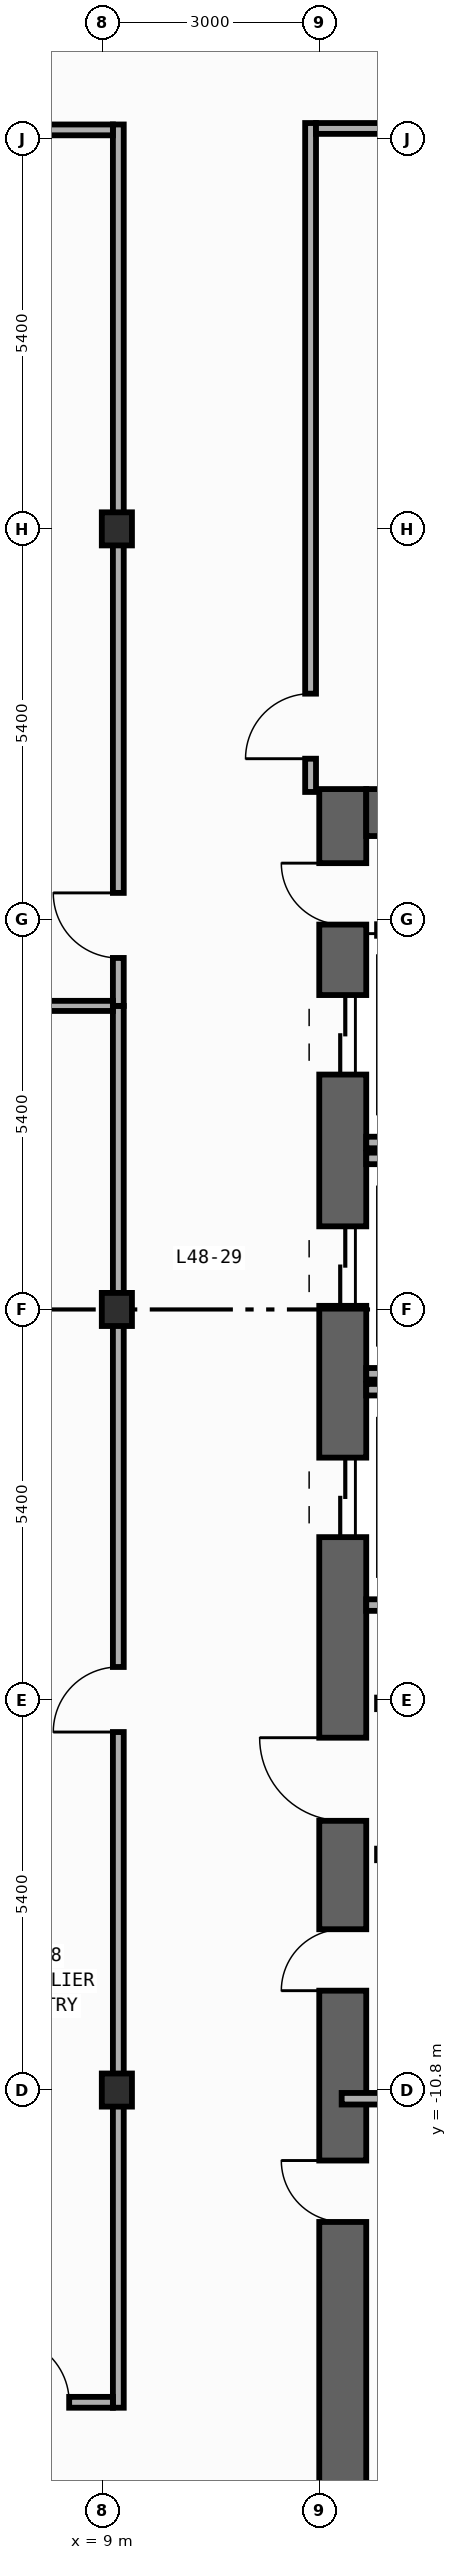
"""IFC4 building model, lengths in metres.
Left out: names, types, materials, properties, quantities, classifications, styles, units other than length and angle.
Written with IfcOpenShell. Run it as: python <this file> out.ifc"""

import sys

from ifc_helpers import new_model, si_unit, direction, frame, frame_2d, origin, origin_2d, place, context, subcontext, project, spatial, rectangle, i_section, extrude, element, fill, save


model = new_model("IFC4")
c1 = context("Model", 3, precision=1e-05, world=origin(), true_north=direction((0.0, 1.0)))
c2 = subcontext(c1, "Body", "Model", "MODEL_VIEW")
j1 = project(units=[si_unit("LENGTHUNIT", "METRE"), si_unit("PLANEANGLEUNIT", "RADIAN")], contexts=[c1])
p1 = place(None, origin())
s1 = spatial("IfcSite", under=j1, at=p1, CompositionType="ELEMENT")
p2 = place(p1, origin())
s2 = spatial("IfcBuilding", under=s1, at=p2, CompositionType="ELEMENT")
p3 = place(p2, frame((0.0, 0.0, 206.8)))
s3 = spatial("IfcBuildingStorey", under=s2, at=p3, CompositionType="ELEMENT", Elevation=206.8)
p4 = place(p3, frame((12.325, -19.8, 0.0), z_axis=(0.0, 0.0, 1.0), x_axis=(0.0, 1.0, 0.0)))
e1 = element("IfcWall", 1, at=p4, inside=s3, PredefinedType="SHEAR", context=c2, shape_type="SweptSolid", body=[
    extrude(rectangle(XDim=27.0, YDim=0.65, at=frame_2d((13.5, 0.0))), origin(), (0.0, 0.0, 1.0), 3.54),
])
p5 = place(p4, frame((23.05, 0.0, 0.0)))
e2 = element("IfcOpeningElement", 2, at=p5, cuts=e1, PredefinedType="OPENING", context=c2, shape_type="SweptSolid", body=[
    extrude(rectangle(XDim=1.1, YDim=2.2, at=frame_2d((0.55, 1.1))), frame((0.0, 0.335, 0.0), z_axis=(0.0, -1.0, 0.0), x_axis=(1.0, 0.0, 0.0)), (0.0, 0.0, 1.0), 0.67),
])
p6 = place(p4, frame((19.85, 0.0, 0.0)))
e3 = element("IfcOpeningElement", 3, at=p6, cuts=e1, PredefinedType="OPENING", context=c2, shape_type="SweptSolid", body=[
    extrude(rectangle(XDim=1.1, YDim=2.2, at=frame_2d((0.55, 1.1))), frame((0.0, 0.335, 0.0), z_axis=(0.0, -1.0, 0.0), x_axis=(1.0, 0.0, 0.0)), (0.0, 0.0, 1.0), 0.67),
])
p7 = place(p4, frame((16.65, 0.0, 0.0)))
e4 = element("IfcOpeningElement", 4, at=p7, cuts=e1, PredefinedType="OPENING", context=c2, shape_type="SweptSolid", body=[
    extrude(rectangle(XDim=1.1, YDim=2.2, at=frame_2d((0.55, 1.1))), frame((0.0, 0.335, 0.0), z_axis=(0.0, -1.0, 0.0), x_axis=(1.0, 0.0, 0.0)), (0.0, 0.0, 1.0), 0.67),
])
p8 = place(p4, frame((7.175, 0.0, 0.0)))
e5 = element("IfcOpeningElement", 5, at=p8, cuts=e1, PredefinedType="OPENING", context=c2, shape_type="SweptSolid", body=[
    extrude(rectangle(XDim=0.85, YDim=2.1, at=frame_2d((0.425, 1.05))), frame((0.0, 0.335, 0.0), z_axis=(0.0, -1.0, 0.0), x_axis=(1.0, 0.0, 0.0)), (0.0, 0.0, 1.0), 0.67),
])
p9 = place(p4, frame((10.375, 0.0, 0.0)))
e6 = element("IfcOpeningElement", 6, at=p9, cuts=e1, PredefinedType="OPENING", context=c2, shape_type="SweptSolid", body=[
    extrude(rectangle(XDim=0.85, YDim=2.1, at=frame_2d((0.425, 1.05))), frame((0.0, 0.335, 0.0), z_axis=(0.0, -1.0, 0.0), x_axis=(1.0, 0.0, 0.0)), (0.0, 0.0, 1.0), 0.67),
])
p10 = place(p4, frame((12.725, 0.0, 0.0)))
e7 = element("IfcOpeningElement", 7, at=p10, cuts=e1, PredefinedType="OPENING", context=c2, shape_type="SweptSolid", body=[
    extrude(rectangle(XDim=1.15, YDim=2.2, at=frame_2d((0.575, 1.1))), frame((0.0, 0.335, 0.0), z_axis=(0.0, -1.0, 0.0), x_axis=(1.0, 0.0, 0.0)), (0.0, 0.0, 1.0), 0.67),
])
p11 = place(p4, frame((25.125, 0.0, 0.0)))
e8 = element("IfcOpeningElement", 8, at=p11, cuts=e1, PredefinedType="OPENING", context=c2, shape_type="SweptSolid", body=[
    extrude(rectangle(XDim=0.85, YDim=2.1, at=frame_2d((0.425, 1.05))), frame((0.0, 0.335, 0.0), z_axis=(0.0, -1.0, 0.0), x_axis=(1.0, 0.0, 0.0)), (0.0, 0.0, 1.0), 0.67),
])
p12 = place(p3, frame((12.65, 6.875, 0.0), z_axis=(0.0, 0.0, 1.0), x_axis=(1.0, 0.0, 0.0)))
e9 = element("IfcWall", 9, at=p12, inside=s3, PredefinedType="SHEAR", context=c2, shape_type="SweptSolid", body=[
    extrude(rectangle(XDim=7.1, YDim=0.65, at=frame_2d((3.55, 0.0))), origin(), (0.0, 0.0, 1.0), 3.54),
])
for number, where, z_axis, x_axis in (
    (10, (9.2, -10.8, 0.0), (0.0, 0.0, 1.0), (1.0, 0.0, 0.0)),
    (11, (9.2, 0.0, 0.0), (0.0, 0.0, 1.0), (1.0, 0.0, 0.0)),
    (12, (9.2, 10.8, 0.0), (0.0, 0.0, 1.0), (1.0, 0.0, 0.0)),
):
    element("IfcColumn", number, at=place(p3, frame(where, z_axis=z_axis, x_axis=x_axis)), inside=s3, PredefinedType="COLUMN", context=c2, shape_type="SweptSolid", body=[
        extrude(i_section(OverallWidth=0.417, OverallDepth=0.458, WebThickness=0.03, FlangeThickness=0.05, FilletRadius=0.022, at=origin_2d()), origin(), (0.0, 0.0, 1.0), 3.8),
    ])
for number, where, z_axis, x_axis in (
    (13, (12.65, 2.31, 0.0), (0.0, 0.0, 1.0), (1.0, 0.0, 0.0)),
    (14, (12.65, -0.89, 0.0), (0.0, 0.0, 1.0), (1.0, 0.0, 0.0)),
    (15, (12.65, 2.09, 0.0), (0.0, 0.0, 1.0), (1.0, 0.0, 0.0)),
    (16, (12.65, -4.09, 0.0), (0.0, 0.0, 1.0), (1.0, 0.0, 0.0)),
    (17, (12.65, -1.11, 0.0), (0.0, 0.0, 1.0), (1.0, 0.0, 0.0)),
):
    element("IfcWall", number, at=place(p3, frame(where, z_axis=z_axis, x_axis=x_axis)), inside=s3, PredefinedType="STANDARD", context=c2, shape_type="SweptSolid", body=[
        extrude(rectangle(XDim=2.34, YDim=0.16, at=frame_2d((1.17, 0.0))), origin(), (0.0, 0.0, 1.0), 3.54),
    ])
for number, where, z_axis, x_axis in (
    (18, (12.8, -5.45, 0.0), (0.0, 0.0, 1.0), (1.0, 0.0, 0.0)),
    (19, (12.8, -7.54, 0.0), (0.0, 0.0, 1.0), (1.0, 0.0, 0.0)),
    (20, (12.8, 5.25, 0.0), (0.0, 0.0, 1.0), (1.0, 0.0, 0.0)),
):
    element("IfcWall", number, at=place(p3, frame(where, z_axis=z_axis, x_axis=x_axis)), inside=s3, PredefinedType="STANDARD", context=c2, shape_type="SweptSolid", body=[
        extrude(rectangle(XDim=2.6, YDim=0.16, at=frame_2d((1.3, 0.0))), origin(), (0.0, 0.0, 1.0), 3.54),
    ])
p13 = place(p3, frame((12.31, -10.92, 0.0), z_axis=(0.0, 0.0, 1.0), x_axis=(1.0, 0.0, 0.0)))
e21 = element("IfcWall", 21, at=p13, inside=s3, PredefinedType="PARTITIONING", context=c2, shape_type="SweptSolid", body=[
    extrude(rectangle(XDim=3.065, YDim=0.16, at=frame_2d((1.532, 0.0))), origin(), (0.0, 0.0, 1.0), 2.952),
])
p14 = place(p3, frame((9.22, -15.195, 0.0), z_axis=(0.0, 0.0, 1.0), x_axis=(0.0, 1.0, 0.0)))
e22 = element("IfcWall", 22, at=p14, inside=s3, PredefinedType="PARTITIONING", context=c2, shape_type="SweptSolid", body=[
    extrude(rectangle(XDim=19.395, YDim=0.15, at=frame_2d((9.698, 0.0))), origin(), (0.0, 0.0, 1.0), 2.952),
])
p15 = place(p14, frame((9.348, 0.0, 0.0)))
e23 = element("IfcOpeningElement", 23, at=p15, cuts=e22, PredefinedType="OPENING", context=c2, shape_type="SweptSolid", body=[
    extrude(rectangle(XDim=0.9, YDim=2.15, at=frame_2d((0.45, 1.075))), frame((0.0, 0.085, 0.0), z_axis=(0.0, -1.0, 0.0), x_axis=(1.0, 0.0, 0.0)), (0.0, 0.0, 1.0), 0.17),
])
p16 = place(p3, frame((9.22, 4.2, 0.0), z_axis=(0.0, 0.0, 1.0), x_axis=(0.0, 1.0, 0.0)))
e24 = element("IfcWall", 24, at=p16, inside=s3, PredefinedType="PARTITIONING", context=c2, shape_type="SweptSolid", body=[
    extrude(rectangle(XDim=12.195, YDim=0.15, at=frame_2d((6.098, 0.0))), origin(), (0.0, 0.0, 1.0), 2.952),
])
p17 = place(p16, frame((0.663, 0.0, 0.0)))
e25 = element("IfcOpeningElement", 25, at=p17, cuts=e24, PredefinedType="OPENING", context=c2, shape_type="SweptSolid", body=[
    extrude(rectangle(XDim=0.9, YDim=2.15, at=frame_2d((0.45, 1.075))), frame((0.0, 0.085, 0.0), z_axis=(0.0, -1.0, 0.0), x_axis=(1.0, 0.0, 0.0)), (0.0, 0.0, 1.0), 0.17),
])
p18 = place(p3, frame((11.88, 7.16, 0.0), z_axis=(0.0, 0.0, 1.0), x_axis=(0.0, 1.0, 0.0)))
e26 = element("IfcWall", 26, at=p18, inside=s3, PredefinedType="PARTITIONING", context=c2, shape_type="SweptSolid", body=[
    extrude(rectangle(XDim=9.255, YDim=0.15, at=frame_2d((4.627, 0.0))), origin(), (0.0, 0.0, 1.0), 3.54),
])
p19 = place(p18, frame((0.46, 0.0, 0.0)))
e27 = element("IfcOpeningElement", 27, at=p19, cuts=e26, PredefinedType="OPENING", context=c2, shape_type="SweptSolid", body=[
    extrude(rectangle(XDim=0.9, YDim=2.15, at=frame_2d((0.45, 1.075))), frame((0.0, 0.085, 0.0), z_axis=(0.0, -1.0, 0.0), x_axis=(1.0, 0.0, 0.0)), (0.0, 0.0, 1.0), 0.17),
])
p20 = place(p3, frame((-0.32, 16.32, 0.0), z_axis=(0.0, 0.0, 1.0), x_axis=(1.0, 0.0, 0.0)))
e28 = element("IfcWall", 28, at=p20, inside=s3, PredefinedType="PARTITIONING", context=c2, shape_type="SweptSolid", body=[
    extrude(rectangle(XDim=9.465, YDim=0.15, at=frame_2d((4.732, 0.0))), origin(), (0.0, 0.0, 1.0), 3.54),
])
p21 = place(p20, frame((6.898, 0.0, 0.0)))
e29 = element("IfcOpeningElement", 29, at=p21, cuts=e28, PredefinedType="OPENING", context=c2, shape_type="SweptSolid", body=[
    extrude(rectangle(XDim=0.9, YDim=2.15, at=frame_2d((0.45, 1.075))), frame((0.0, 0.085, 0.0), z_axis=(0.0, -1.0, 0.0), x_axis=(1.0, 0.0, 0.0)), (0.0, 0.0, 1.0), 0.17),
])
p22 = place(p3, frame((11.955, 16.34, 0.0), z_axis=(0.0, 0.0, 1.0), x_axis=(1.0, 0.0, 0.0)))
e30 = element("IfcWall", 30, at=p22, inside=s3, PredefinedType="PARTITIONING", context=c2, shape_type="SweptSolid", body=[
    extrude(rectangle(XDim=10.5, YDim=0.15, at=frame_2d((5.25, 0.0))), origin(), (0.0, 0.0, 1.0), 3.54),
])
p23 = place(p22, frame((4.901, 0.0, 0.0)))
e31 = element("IfcOpeningElement", 31, at=p23, cuts=e30, PredefinedType="OPENING", context=c2, shape_type="SweptSolid", body=[
    extrude(rectangle(XDim=0.9, YDim=2.15, at=frame_2d((0.45, 1.075))), frame((0.0, 0.085, 0.0), z_axis=(0.0, -1.0, 0.0), x_axis=(1.0, 0.0, 0.0)), (0.0, 0.0, 1.0), 0.17),
])
p24 = place(p3, frame((7.18, -15.12, 0.0), z_axis=(0.0, 0.0, 1.0), x_axis=(1.0, 0.0, 0.0)))
e32 = element("IfcWall", 32, at=p24, inside=s3, PredefinedType="PARTITIONING", context=c2, shape_type="SweptSolid", body=[
    extrude(rectangle(XDim=1.965, YDim=0.15, at=frame_2d((0.982, 0.0))), origin(), (0.0, 0.0, 1.0), 3.54),
])
p25 = place(p24, frame((0.46, 0.0, 0.0)))
e33 = element("IfcOpeningElement", 33, at=p25, cuts=e32, PredefinedType="OPENING", context=c2, shape_type="SweptSolid", body=[
    extrude(rectangle(XDim=0.9, YDim=2.15, at=frame_2d((0.45, 1.075))), frame((0.0, 0.085, 0.0), z_axis=(0.0, -1.0, 0.0), x_axis=(1.0, 0.0, 0.0)), (0.0, 0.0, 1.0), 0.17),
])
p26 = place(p3, frame((7.02, 4.2, 0.0), z_axis=(0.0, 0.0, 1.0), x_axis=(1.0, 0.0, 0.0)))
e34 = element("IfcWall", 34, at=p26, inside=s3, PredefinedType="PARTITIONING", context=c2, shape_type="SweptSolid", body=[
    extrude(rectangle(XDim=2.125, YDim=0.14, at=frame_2d((1.062, 0.0))), origin(), (0.0, 0.0, 1.0), 3.54),
])
p27 = place(p5, origin())
e35 = element("IfcDoor", 35, at=p27, inside=s3, OperationType="DOUBLE_DOOR_SLIDING", PredefinedType="DOOR", context=c2, shape_type="SweptSolid", body=[
    extrude(rectangle(XDim=1.1, YDim=2.2, at=frame_2d((0.55, 1.1))), frame((0.0, 0.025, 0.0), z_axis=(0.0, -1.0, 0.0), x_axis=(1.0, 0.0, 0.0)), (0.0, 0.0, 1.0), 0.05),
])
fill(e2, e35)
p28 = place(p6, origin())
e36 = element("IfcDoor", 36, at=p28, inside=s3, OperationType="DOUBLE_DOOR_SLIDING", PredefinedType="DOOR", context=c2, shape_type="SweptSolid", body=[
    extrude(rectangle(XDim=1.1, YDim=2.2, at=frame_2d((0.55, 1.1))), frame((0.0, 0.025, 0.0), z_axis=(0.0, -1.0, 0.0), x_axis=(1.0, 0.0, 0.0)), (0.0, 0.0, 1.0), 0.05),
])
fill(e3, e36)
p29 = place(p7, origin())
e37 = element("IfcDoor", 37, at=p29, inside=s3, OperationType="DOUBLE_DOOR_SLIDING", PredefinedType="DOOR", context=c2, shape_type="SweptSolid", body=[
    extrude(rectangle(XDim=1.1, YDim=2.2, at=frame_2d((0.55, 1.1))), frame((0.0, 0.025, 0.0), z_axis=(0.0, -1.0, 0.0), x_axis=(1.0, 0.0, 0.0)), (0.0, 0.0, 1.0), 0.05),
])
fill(e4, e37)
p30 = place(p8, origin())
e38 = element("IfcDoor", 38, at=p30, inside=s3, OperationType="SINGLE_SWING_RIGHT", PredefinedType="DOOR", context=c2, shape_type="SweptSolid", body=[
    extrude(rectangle(XDim=0.85, YDim=2.1, at=frame_2d((0.425, 1.05))), frame((0.0, 0.025, 0.0), z_axis=(0.0, -1.0, 0.0), x_axis=(1.0, 0.0, 0.0)), (0.0, 0.0, 1.0), 0.05),
])
fill(e5, e38)
p31 = place(p9, origin())
e39 = element("IfcDoor", 39, at=p31, inside=s3, OperationType="SINGLE_SWING_LEFT", PredefinedType="DOOR", context=c2, shape_type="SweptSolid", body=[
    extrude(rectangle(XDim=0.85, YDim=2.1, at=frame_2d((0.425, 1.05))), frame((0.0, 0.025, 0.0), z_axis=(0.0, -1.0, 0.0), x_axis=(1.0, 0.0, 0.0)), (0.0, 0.0, 1.0), 0.05),
])
fill(e6, e39)
p32 = place(p10, origin())
e40 = element("IfcDoor", 40, at=p32, inside=s3, OperationType="SINGLE_SWING_RIGHT", PredefinedType="DOOR", context=c2, shape_type="SweptSolid", body=[
    extrude(rectangle(XDim=1.15, YDim=2.2, at=frame_2d((0.575, 1.1))), frame((0.0, 0.025, 0.0), z_axis=(0.0, -1.0, 0.0), x_axis=(1.0, 0.0, 0.0)), (0.0, 0.0, 1.0), 0.05),
])
fill(e7, e40)
p33 = place(p11, origin())
e41 = element("IfcDoor", 41, at=p33, inside=s3, OperationType="SINGLE_SWING_RIGHT", PredefinedType="DOOR", context=c2, shape_type="SweptSolid", body=[
    extrude(rectangle(XDim=0.85, YDim=2.1, at=frame_2d((0.425, 1.05))), frame((0.0, 0.025, 0.0), z_axis=(0.0, -1.0, 0.0), x_axis=(1.0, 0.0, 0.0)), (0.0, 0.0, 1.0), 0.05),
])
fill(e8, e41)
p34 = place(p15, origin())
e42 = element("IfcDoor", 42, at=p34, inside=s3, OperationType="SINGLE_SWING_LEFT", PredefinedType="DOOR", context=c2, shape_type="SweptSolid", body=[
    extrude(rectangle(XDim=0.9, YDim=2.15, at=frame_2d((0.45, 1.075))), frame((0.0, 0.025, 0.0), z_axis=(0.0, -1.0, 0.0), x_axis=(1.0, 0.0, 0.0)), (0.0, 0.0, 1.0), 0.05),
])
fill(e23, e42)
p35 = place(p17, origin())
e43 = element("IfcDoor", 43, at=p35, inside=s3, OperationType="SINGLE_SWING_RIGHT", PredefinedType="DOOR", context=c2, shape_type="SweptSolid", body=[
    extrude(rectangle(XDim=0.9, YDim=2.15, at=frame_2d((0.45, 1.075))), frame((0.0, 0.025, 0.0), z_axis=(0.0, -1.0, 0.0), x_axis=(1.0, 0.0, 0.0)), (0.0, 0.0, 1.0), 0.05),
])
fill(e25, e43)
p36 = place(p19, origin())
e44 = element("IfcDoor", 44, at=p36, inside=s3, OperationType="SINGLE_SWING_LEFT", PredefinedType="DOOR", context=c2, shape_type="SweptSolid", body=[
    extrude(rectangle(XDim=0.9, YDim=2.15, at=frame_2d((0.45, 1.075))), frame((0.0, 0.025, 0.0), z_axis=(0.0, -1.0, 0.0), x_axis=(1.0, 0.0, 0.0)), (0.0, 0.0, 1.0), 0.05),
])
fill(e27, e44)
p37 = place(p25, origin())
e45 = element("IfcDoor", 45, at=p37, inside=s3, OperationType="SINGLE_SWING_LEFT", PredefinedType="DOOR", context=c2, shape_type="SweptSolid", body=[
    extrude(rectangle(XDim=0.9, YDim=2.15, at=frame_2d((0.45, 1.075))), frame((0.0, 0.025, 0.0), z_axis=(0.0, -1.0, 0.0), x_axis=(1.0, 0.0, 0.0)), (0.0, 0.0, 1.0), 0.05),
])
fill(e33, e45)
save(model, sys.argv[1])
